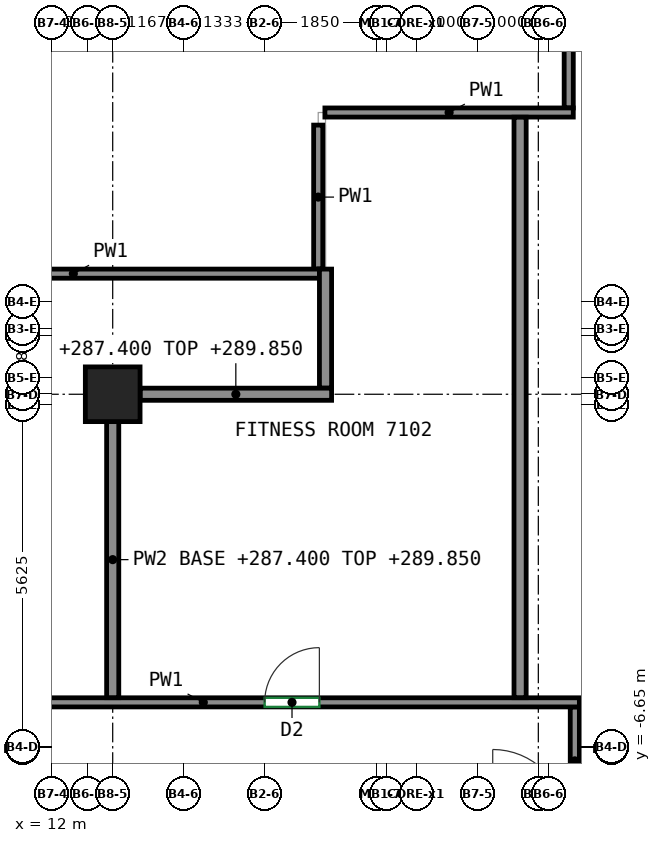
"""IFC4 building model, lengths in metres.
Left out: names, types, materials, properties, quantities, classifications, styles, units other than length and angle.
Written with IfcOpenShell. Run it as: python <this file> out.ifc"""

import sys

from ifc_helpers import new_model, si_unit, direction, frame, frame_2d, origin, origin_2d, place, context, subcontext, project, spatial, rectangle, extrude, source, transform, mapped, element, fill, save


model = new_model("IFC4")
c1 = context("Model", 3, precision=1e-05, world=origin(), true_north=direction((0.0, 1.0)))
c2 = subcontext(c1, "Body", "Model", "MODEL_VIEW")
j1 = project(units=[si_unit("LENGTHUNIT", "METRE"), si_unit("PLANEANGLEUNIT", "RADIAN")], contexts=[c1])
p1 = place(None, origin())
s1 = spatial("IfcSite", under=j1, at=p1, CompositionType="ELEMENT")
p2 = place(p1, origin())
s2 = spatial("IfcBuilding", under=s1, at=p2, CompositionType="ELEMENT")
p3 = place(p2, frame((0.0, 0.0, 287.4)))
s3 = spatial("IfcBuildingStorey", under=s2, at=p3, CompositionType="ELEMENT", Elevation=287.4)
m1 = source(origin(), c2, "Body", "SweptSolid", [
    extrude(rectangle(XDim=0.9, YDim=0.9, at=origin_2d()), origin(), (0.0, 0.0, 1.0), 3.0),
])
p4 = place(p3, frame((13.0, -0.833, 0.0), z_axis=(0.0, 0.0, 1.0), x_axis=(1.0, 0.0, 0.0)))
e1 = element("IfcColumn", 1, at=p4, inside=s3, PredefinedType="COLUMN", context=c2, shape_type="MappedRepresentation", body=[
    mapped(m1, transform((0.0, 0.0, 0.0))),
])
p5 = place(p3, frame((20.5, 3.875, 0.0), z_axis=(0.0, 0.0, 1.0), x_axis=(0.0, 1.0, 0.0)))
e2 = element("IfcWall", 2, at=p5, inside=s3, PredefinedType="PARTITIONING", context=c2, shape_type="SweptSolid", body=[
    extrude(rectangle(XDim=18.035, YDim=0.15, at=frame_2d((9.018, 0.0))), origin(), (0.0, 0.0, 1.0), 3.0),
])
p6 = place(p5, frame((15.532, 0.0, 0.0)))
e3 = element("IfcOpeningElement", 3, at=p6, cuts=e2, PredefinedType="OPENING", context=c2, shape_type="SweptSolid", body=[
    extrude(rectangle(XDim=0.9, YDim=2.1, at=frame_2d((0.45, 1.05))), frame((0.0, 0.085, 0.0), z_axis=(0.0, -1.0, 0.0), x_axis=(1.0, 0.0, 0.0)), (0.0, 0.0, 1.0), 0.17),
])
p7 = place(p3, frame((20.6, -7.75, 0.0), z_axis=(0.0, 0.0, 1.0), x_axis=(0.0, 1.0, 0.0)))
e4 = element("IfcWall", 4, at=p7, inside=s3, PredefinedType="PARTITIONING", context=c2, shape_type="SweptSolid", body=[
    extrude(rectangle(XDim=1.775, YDim=0.15, at=frame_2d((0.887, 0.0))), origin(), (0.0, 0.0, 1.0), 3.0),
])
p8 = place(p3, frame((16.38, 1.225, 0.0), z_axis=(0.0, 0.0, 1.0), x_axis=(0.0, 1.0, 0.0)))
e5 = element("IfcWall", 5, at=p8, inside=s3, PredefinedType="PARTITIONING", context=c2, shape_type="SweptSolid", body=[
    extrude(rectangle(XDim=2.368, YDim=0.15, at=frame_2d((1.184, 0.0))), origin(), (0.0, 0.0, 1.0), 3.0),
])
p9 = place(p3, frame((8.305, 1.15, 0.0), z_axis=(0.0, 0.0, 1.0), x_axis=(1.0, 0.0, 0.0)))
e6 = element("IfcWall", 6, at=p9, inside=s3, PredefinedType="PARTITIONING", context=c2, shape_type="SweptSolid", body=[
    extrude(rectangle(XDim=8.095, YDim=0.15, at=frame_2d((4.047, 0.0))), origin(), (0.0, 0.0, 1.0), 3.0),
])
p10 = place(p9, frame((2.013, 0.0, 0.0)))
e7 = element("IfcOpeningElement", 7, at=p10, cuts=e6, PredefinedType="OPENING", context=c2, shape_type="SweptSolid", body=[
    extrude(rectangle(XDim=0.9, YDim=2.1, at=frame_2d((0.45, 1.05))), frame((0.0, 0.085, 0.0), z_axis=(0.0, -1.0, 0.0), x_axis=(1.0, 0.0, 0.0)), (0.0, 0.0, 1.0), 0.17),
])
p11 = place(p3, frame((8.305, -5.9, 0.0), z_axis=(0.0, 0.0, 1.0), x_axis=(1.0, 0.0, 0.0)))
e8 = element("IfcWall", 8, at=p11, inside=s3, PredefinedType="PARTITIONING", context=c2, shape_type="SweptSolid", body=[
    extrude(rectangle(XDim=12.37, YDim=0.15, at=frame_2d((6.185, 0.0))), origin(), (0.0, 0.0, 1.0), 3.0),
])
p12 = place(p11, frame((7.194, 0.0, 0.0)))
e9 = element("IfcOpeningElement", 9, at=p12, cuts=e8, PredefinedType="OPENING", context=c2, shape_type="SweptSolid", body=[
    extrude(rectangle(XDim=0.9, YDim=2.1, at=frame_2d((0.45, 1.05))), frame((0.0, 0.085, 0.0), z_axis=(0.0, -1.0, 0.0), x_axis=(1.0, 0.0, 0.0)), (0.0, 0.0, 1.0), 0.17),
])
p13 = place(p3, frame((16.49, 3.8, 0.0), z_axis=(0.0, 0.0, 1.0), x_axis=(1.0, 0.0, 0.0)))
e10 = element("IfcWall", 10, at=p13, inside=s3, PredefinedType="PARTITIONING", context=c2, shape_type="SweptSolid", body=[
    extrude(rectangle(XDim=4.085, YDim=0.15, at=frame_2d((2.042, 0.0))), origin(), (0.0, 0.0, 1.0), 3.0),
])
p14 = place(p3, frame((19.7, 3.723, 0.0), z_axis=(0.0, 0.0, 1.0), x_axis=(0.0, -1.0, 0.0)))
e11 = element("IfcWall", 11, at=p14, inside=s3, PredefinedType="PARTITIONING", context=c2, shape_type="SweptSolid", body=[
    extrude(rectangle(XDim=9.546, YDim=0.2, at=frame_2d((4.773, 0.0))), origin(), (0.0, 0.0, 1.0), 3.0),
])
p15 = place(p3, frame((16.5, -0.733, 0.0), z_axis=(0.0, 0.0, 1.0), x_axis=(0.0, 1.0, 0.0)))
e12 = element("IfcWall", 12, at=p15, inside=s3, PredefinedType="PARTITIONING", context=c2, shape_type="SweptSolid", body=[
    extrude(rectangle(XDim=1.958, YDim=0.2, at=frame_2d((0.979, 0.0))), origin(), (0.0, 0.0, 1.0), 3.0),
])
p16 = place(p3, frame((13.45, -0.833, 0.0), z_axis=(0.0, 0.0, 1.0), x_axis=(1.0, 0.0, 0.0)))
e13 = element("IfcWall", 13, at=p16, inside=s3, PredefinedType="PARTITIONING", context=c2, shape_type="SweptSolid", body=[
    extrude(rectangle(XDim=3.15, YDim=0.2, at=frame_2d((1.575, 0.0))), origin(), (0.0, 0.0, 1.0), 2.45),
])
p17 = place(p3, frame((13.0, -5.823, 0.0), z_axis=(0.0, 0.0, 1.0), x_axis=(0.0, 1.0, 0.0)))
e14 = element("IfcWall", 14, at=p17, inside=s3, PredefinedType="PARTITIONING", context=c2, shape_type="SweptSolid", body=[
    extrude(rectangle(XDim=4.54, YDim=0.2, at=frame_2d((2.27, 0.0))), origin(), (0.0, 0.0, 1.0), 2.45),
])
p18 = place(p12, origin())
e15 = element("IfcDoor", 15, at=p18, inside=s3, OperationType="SINGLE_SWING_RIGHT", PredefinedType="DOOR", context=c2, shape_type="SweptSolid", body=[
    extrude(rectangle(XDim=0.9, YDim=2.1, at=frame_2d((0.45, 1.05))), frame((0.0, 0.025, 0.0), z_axis=(0.0, -1.0, 0.0), x_axis=(1.0, 0.0, 0.0)), (0.0, 0.0, 1.0), 0.05),
])
fill(e9, e15)
save(model, sys.argv[1])
